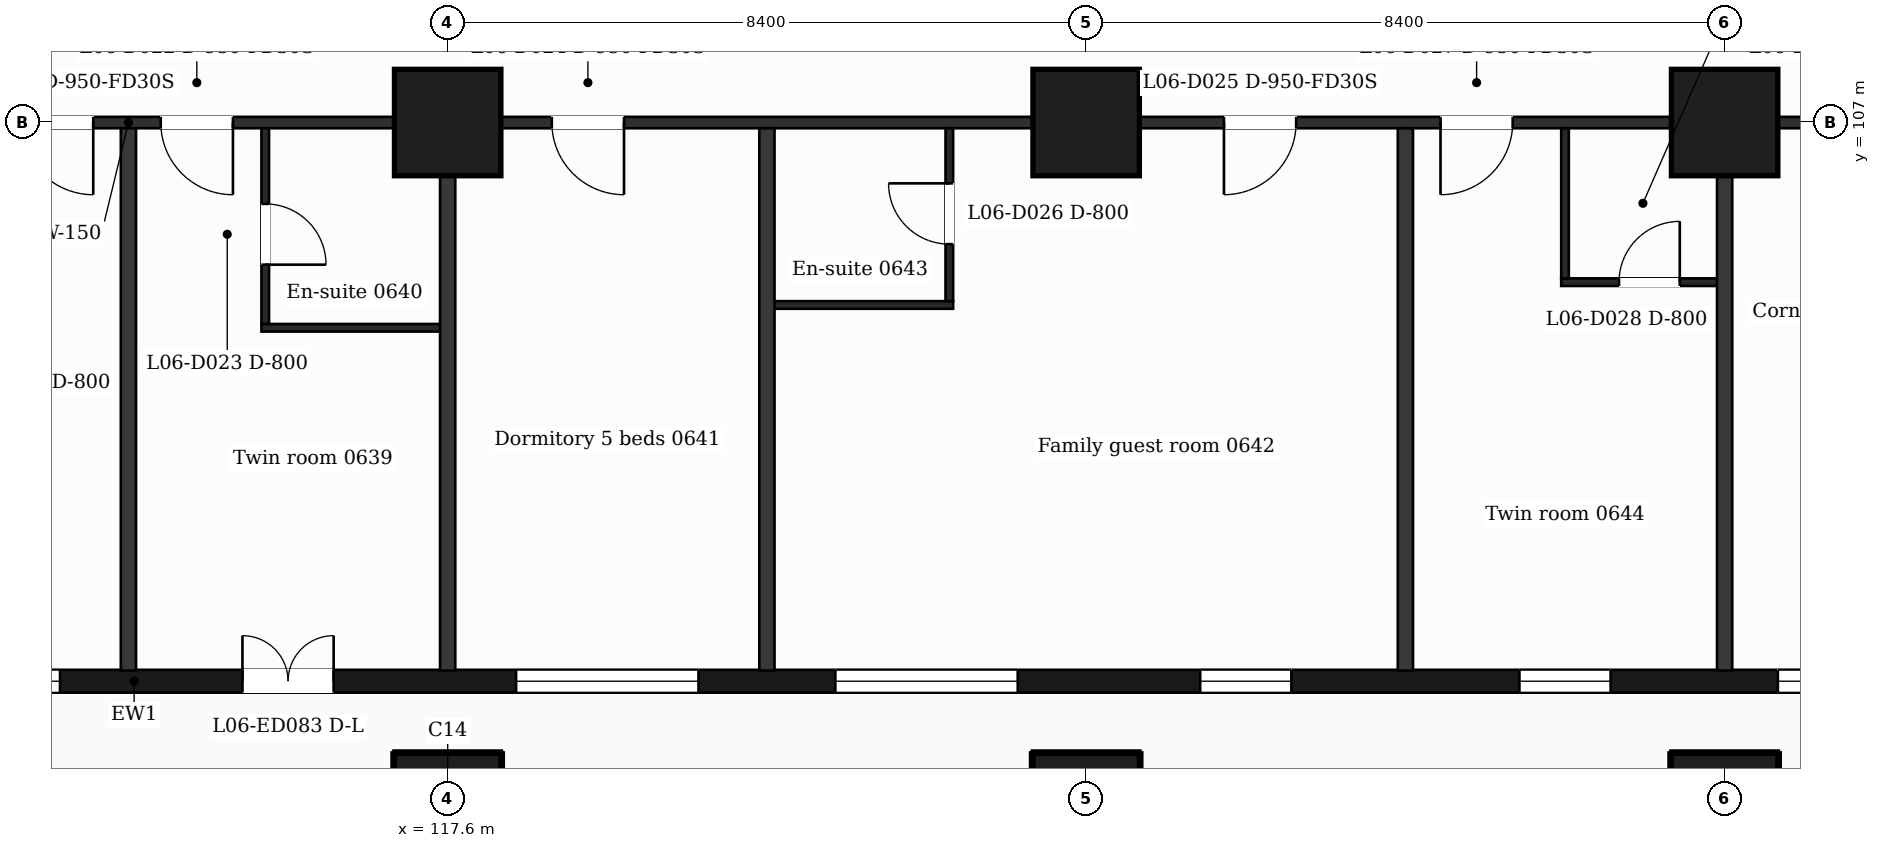
"""IFC4 building model, lengths in metres.
Left out: names, types, materials, properties, quantities, classifications, styles, units other than length and angle.
Written with IfcOpenShell. Run it as: python <this file> out.ifc"""

import sys

from ifc_helpers import new_model, si_unit, direction, frame, frame_2d, origin, origin_2d, place, context, subcontext, project, spatial, rectangle, extrude, element, fill, save


model = new_model("IFC4")
c1 = context("Model", 3, precision=1e-05, world=origin(), true_north=direction((0.0, 1.0)))
c2 = subcontext(c1, "Body", "Model", "MODEL_VIEW")
j1 = project(units=[si_unit("LENGTHUNIT", "METRE"), si_unit("PLANEANGLEUNIT", "RADIAN")], contexts=[c1])
p1 = place(None, origin())
s1 = spatial("IfcSite", under=j1, at=p1, CompositionType="ELEMENT")
p2 = place(p1, origin())
s2 = spatial("IfcBuilding", under=s1, at=p2, CompositionType="ELEMENT")
p3 = place(p2, frame((0.0, 0.0, 39.0)))
s3 = spatial("IfcBuildingStorey", under=s2, at=p3, CompositionType="ELEMENT", Elevation=39.0)
for number, where, z_axis, x_axis in (
    (1, (117.6, 98.0, -0.32), (0.0, 0.0, 1.0), (1.0, 0.0, 0.0)),
    (2, (126.0, 98.0, -0.32), (0.0, 0.0, 1.0), (1.0, 0.0, 0.0)),
    (3, (134.4, 98.0, -0.32), (0.0, 0.0, 1.0), (1.0, 0.0, 0.0)),
    (4, (117.6, 107.0, -0.32), (0.0, 0.0, 1.0), (1.0, 0.0, 0.0)),
    (5, (126.0, 107.0, -0.32), (0.0, 0.0, 1.0), (1.0, 0.0, 0.0)),
    (6, (134.4, 107.0, -0.32), (0.0, 0.0, 1.0), (1.0, 0.0, 0.0)),
):
    element("IfcColumn", number, at=place(p3, frame(where, z_axis=z_axis, x_axis=x_axis)), inside=s3, PredefinedType="COLUMN", context=c2, shape_type="SweptSolid", body=[
        extrude(rectangle(XDim=1.4, YDim=1.4, at=origin_2d()), origin(), (0.0, 0.0, 1.0), 3.82),
    ])
p4 = place(p3, frame((89.85, 99.65, 0.0), z_axis=(0.0, 0.0, 1.0), x_axis=(1.0, 0.0, 0.0)))
e7 = element("IfcWall", 7, at=p4, inside=s3, PredefinedType="SOLIDWALL", context=c2, shape_type="SweptSolid", body=[
    extrude(rectangle(XDim=47.25, YDim=0.3, at=frame_2d((23.625, 0.0))), origin(), (0.0, 0.0, 1.0), 3.18),
])
p5 = place(p4, frame((0.725, 0.0, 0.9)))
e8 = element("IfcOpeningElement", 8, at=p5, cuts=e7, PredefinedType="OPENING", context=c2, shape_type="SweptSolid", body=[
    extrude(rectangle(XDim=1.2, YDim=2.1, at=frame_2d((0.6, 1.05))), frame((0.0, 0.16, 0.0), z_axis=(0.0, -1.0, 0.0), x_axis=(1.0, 0.0, 0.0)), (0.0, 0.0, 1.0), 0.32),
])
p6 = place(p4, frame((3.45, 0.0, 0.9)))
e9 = element("IfcOpeningElement", 9, at=p6, cuts=e7, PredefinedType="OPENING", context=c2, shape_type="SweptSolid", body=[
    extrude(rectangle(XDim=2.4, YDim=2.1, at=frame_2d((1.2, 1.05))), frame((0.0, 0.16, 0.0), z_axis=(0.0, -1.0, 0.0), x_axis=(1.0, 0.0, 0.0)), (0.0, 0.0, 1.0), 0.32),
])
p7 = place(p4, frame((8.25, 0.0, 0.9)))
e10 = element("IfcOpeningElement", 10, at=p7, cuts=e7, PredefinedType="OPENING", context=c2, shape_type="SweptSolid", body=[
    extrude(rectangle(XDim=1.2, YDim=2.1, at=frame_2d((0.6, 1.05))), frame((0.0, 0.16, 0.0), z_axis=(0.0, -1.0, 0.0), x_axis=(1.0, 0.0, 0.0)), (0.0, 0.0, 1.0), 0.32),
])
p8 = place(p4, frame((12.45, 0.0, 0.9)))
e11 = element("IfcOpeningElement", 11, at=p8, cuts=e7, PredefinedType="OPENING", context=c2, shape_type="SweptSolid", body=[
    extrude(rectangle(XDim=1.2, YDim=2.1, at=frame_2d((0.6, 1.05))), frame((0.0, 0.16, 0.0), z_axis=(0.0, -1.0, 0.0), x_axis=(1.0, 0.0, 0.0)), (0.0, 0.0, 1.0), 0.32),
])
p9 = place(p4, frame((16.05, 0.0, 0.9)))
e12 = element("IfcOpeningElement", 12, at=p9, cuts=e7, PredefinedType="OPENING", context=c2, shape_type="SweptSolid", body=[
    extrude(rectangle(XDim=2.4, YDim=2.1, at=frame_2d((1.2, 1.05))), frame((0.0, 0.16, 0.0), z_axis=(0.0, -1.0, 0.0), x_axis=(1.0, 0.0, 0.0)), (0.0, 0.0, 1.0), 0.32),
])
p10 = place(p4, frame((20.25, 0.0, 0.9)))
e13 = element("IfcOpeningElement", 13, at=p10, cuts=e7, PredefinedType="OPENING", context=c2, shape_type="SweptSolid", body=[
    extrude(rectangle(XDim=2.4, YDim=2.1, at=frame_2d((1.2, 1.05))), frame((0.0, 0.16, 0.0), z_axis=(0.0, -1.0, 0.0), x_axis=(1.0, 0.0, 0.0)), (0.0, 0.0, 1.0), 0.32),
])
p11 = place(p4, frame((25.05, 0.0, 0.0)))
e14 = element("IfcOpeningElement", 14, at=p11, cuts=e7, PredefinedType="OPENING", context=c2, shape_type="SweptSolid", body=[
    extrude(rectangle(XDim=1.2, YDim=2.4, at=frame_2d((0.6, 1.2))), frame((0.0, 0.16, 0.0), z_axis=(0.0, -1.0, 0.0), x_axis=(1.0, 0.0, 0.0)), (0.0, 0.0, 1.0), 0.32),
])
p12 = place(p4, frame((28.65, 0.0, 0.9)))
e15 = element("IfcOpeningElement", 15, at=p12, cuts=e7, PredefinedType="OPENING", context=c2, shape_type="SweptSolid", body=[
    extrude(rectangle(XDim=2.4, YDim=2.1, at=frame_2d((1.2, 1.05))), frame((0.0, 0.16, 0.0), z_axis=(0.0, -1.0, 0.0), x_axis=(1.0, 0.0, 0.0)), (0.0, 0.0, 1.0), 0.32),
])
p13 = place(p4, frame((32.85, 0.0, 0.9)))
e16 = element("IfcOpeningElement", 16, at=p13, cuts=e7, PredefinedType="OPENING", context=c2, shape_type="SweptSolid", body=[
    extrude(rectangle(XDim=2.4, YDim=2.1, at=frame_2d((1.2, 1.05))), frame((0.0, 0.16, 0.0), z_axis=(0.0, -1.0, 0.0), x_axis=(1.0, 0.0, 0.0)), (0.0, 0.0, 1.0), 0.32),
])
p14 = place(p4, frame((37.65, 0.0, 0.9)))
e17 = element("IfcOpeningElement", 17, at=p14, cuts=e7, PredefinedType="OPENING", context=c2, shape_type="SweptSolid", body=[
    extrude(rectangle(XDim=1.2, YDim=2.1, at=frame_2d((0.6, 1.05))), frame((0.0, 0.16, 0.0), z_axis=(0.0, -1.0, 0.0), x_axis=(1.0, 0.0, 0.0)), (0.0, 0.0, 1.0), 0.32),
])
p15 = place(p4, frame((41.85, 0.0, 0.9)))
e18 = element("IfcOpeningElement", 18, at=p15, cuts=e7, PredefinedType="OPENING", context=c2, shape_type="SweptSolid", body=[
    extrude(rectangle(XDim=1.2, YDim=2.1, at=frame_2d((0.6, 1.05))), frame((0.0, 0.16, 0.0), z_axis=(0.0, -1.0, 0.0), x_axis=(1.0, 0.0, 0.0)), (0.0, 0.0, 1.0), 0.32),
])
p16 = place(p4, frame((45.25, 0.0, 0.9)))
e19 = element("IfcOpeningElement", 19, at=p16, cuts=e7, PredefinedType="OPENING", context=c2, shape_type="SweptSolid", body=[
    extrude(rectangle(XDim=1.2, YDim=2.1, at=frame_2d((0.6, 1.05))), frame((0.0, 0.16, 0.0), z_axis=(0.0, -1.0, 0.0), x_axis=(1.0, 0.0, 0.0)), (0.0, 0.0, 1.0), 0.32),
])
p17 = place(p3, frame((115.15, 104.3, 0.0), z_axis=(0.0, 0.0, 1.0), x_axis=(1.0, 0.0, 0.0)))
e20 = element("IfcWall", 20, at=p17, inside=s3, PredefinedType="PARTITIONING", context=c2, shape_type="SweptSolid", body=[
    extrude(rectangle(XDim=2.45, YDim=0.1, at=frame_2d((1.225, 0.0))), origin(), (0.0, 0.0, 1.0), 3.18),
])
p18 = place(p3, frame((121.8, 104.6, 0.0), z_axis=(0.0, 0.0, 1.0), x_axis=(1.0, 0.0, 0.0)))
e21 = element("IfcWall", 21, at=p18, inside=s3, PredefinedType="PARTITIONING", context=c2, shape_type="SweptSolid", body=[
    extrude(rectangle(XDim=2.45, YDim=0.1, at=frame_2d((1.225, 0.0))), origin(), (0.0, 0.0, 1.0), 3.18),
])
p19 = place(p3, frame((132.25, 104.9, 0.0), z_axis=(0.0, 0.0, 1.0), x_axis=(1.0, 0.0, 0.0)))
e22 = element("IfcWall", 22, at=p19, inside=s3, PredefinedType="PARTITIONING", context=c2, shape_type="SweptSolid", body=[
    extrude(rectangle(XDim=2.15, YDim=0.1, at=frame_2d((1.075, 0.0))), origin(), (0.0, 0.0, 1.0), 3.18),
])
p20 = place(p19, frame((0.76, 0.0, 0.0)))
e23 = element("IfcOpeningElement", 23, at=p20, cuts=e22, PredefinedType="OPENING", context=c2, shape_type="SweptSolid", body=[
    extrude(rectangle(XDim=0.8, YDim=2.1, at=frame_2d((0.4, 1.05))), frame((0.0, 0.06, 0.0), z_axis=(0.0, -1.0, 0.0), x_axis=(1.0, 0.0, 0.0)), (0.0, 0.0, 1.0), 0.12),
])
p21 = place(p3, frame((87.018, 107.0, 0.0), z_axis=(0.0, 0.0, 1.0), x_axis=(1.0, 0.0, 0.0)))
e24 = element("IfcWall", 24, at=p21, inside=s3, PredefinedType="PARTITIONING", context=c2, shape_type="SweptSolid", body=[
    extrude(rectangle(XDim=52.765, YDim=0.15, at=frame_2d((26.382, 0.0))), origin(), (0.0, 0.0, 1.0), 3.18),
])
p22 = place(p21, frame((1.032, 0.0, 0.0)))
e25 = element("IfcOpeningElement", 25, at=p22, cuts=e24, PredefinedType="OPENING", context=c2, shape_type="SweptSolid", body=[
    extrude(rectangle(XDim=0.95, YDim=2.1, at=frame_2d((0.475, 1.05))), frame((0.0, 0.085, 0.0), z_axis=(0.0, -1.0, 0.0), x_axis=(1.0, 0.0, 0.0)), (0.0, 0.0, 1.0), 0.17),
])
p23 = place(p21, frame((6.369, 0.0, 0.0)))
e26 = element("IfcOpeningElement", 26, at=p23, cuts=e24, PredefinedType="OPENING", context=c2, shape_type="SweptSolid", body=[
    extrude(rectangle(XDim=0.95, YDim=2.1, at=frame_2d((0.475, 1.05))), frame((0.0, 0.085, 0.0), z_axis=(0.0, -1.0, 0.0), x_axis=(1.0, 0.0, 0.0)), (0.0, 0.0, 1.0), 0.17),
])
p24 = place(p21, frame((10.952, 0.0, 0.0)))
e27 = element("IfcOpeningElement", 27, at=p24, cuts=e24, PredefinedType="OPENING", context=c2, shape_type="SweptSolid", body=[
    extrude(rectangle(XDim=0.95, YDim=2.1, at=frame_2d((0.475, 1.05))), frame((0.0, 0.085, 0.0), z_axis=(0.0, -1.0, 0.0), x_axis=(1.0, 0.0, 0.0)), (0.0, 0.0, 1.0), 0.17),
])
p25 = place(p21, frame((16.045, 0.0, 0.0)))
e28 = element("IfcOpeningElement", 28, at=p25, cuts=e24, PredefinedType="OPENING", context=c2, shape_type="SweptSolid", body=[
    extrude(rectangle(XDim=0.95, YDim=2.1, at=frame_2d((0.475, 1.05))), frame((0.0, 0.085, 0.0), z_axis=(0.0, -1.0, 0.0), x_axis=(1.0, 0.0, 0.0)), (0.0, 0.0, 1.0), 0.17),
])
p26 = place(p21, frame((20.245, 0.0, 0.0)))
e29 = element("IfcOpeningElement", 29, at=p26, cuts=e24, PredefinedType="OPENING", context=c2, shape_type="SweptSolid", body=[
    extrude(rectangle(XDim=0.95, YDim=2.1, at=frame_2d((0.475, 1.05))), frame((0.0, 0.085, 0.0), z_axis=(0.0, -1.0, 0.0), x_axis=(1.0, 0.0, 0.0)), (0.0, 0.0, 1.0), 0.17),
])
p27 = place(p21, frame((24.969, 0.0, 0.0)))
e30 = element("IfcOpeningElement", 30, at=p27, cuts=e24, PredefinedType="OPENING", context=c2, shape_type="SweptSolid", body=[
    extrude(rectangle(XDim=0.95, YDim=2.1, at=frame_2d((0.475, 1.05))), frame((0.0, 0.085, 0.0), z_axis=(0.0, -1.0, 0.0), x_axis=(1.0, 0.0, 0.0)), (0.0, 0.0, 1.0), 0.17),
])
p28 = place(p21, frame((26.807, 0.0, 0.0)))
e31 = element("IfcOpeningElement", 31, at=p28, cuts=e24, PredefinedType="OPENING", context=c2, shape_type="SweptSolid", body=[
    extrude(rectangle(XDim=0.95, YDim=2.1, at=frame_2d((0.475, 1.05))), frame((0.0, 0.085, 0.0), z_axis=(0.0, -1.0, 0.0), x_axis=(1.0, 0.0, 0.0)), (0.0, 0.0, 1.0), 0.17),
])
p29 = place(p21, frame((31.952, 0.0, 0.0)))
e32 = element("IfcOpeningElement", 32, at=p29, cuts=e24, PredefinedType="OPENING", context=c2, shape_type="SweptSolid", body=[
    extrude(rectangle(XDim=0.95, YDim=2.1, at=frame_2d((0.475, 1.05))), frame((0.0, 0.085, 0.0), z_axis=(0.0, -1.0, 0.0), x_axis=(1.0, 0.0, 0.0)), (0.0, 0.0, 1.0), 0.17),
])
p30 = place(p21, frame((40.795, 0.0, 0.0)))
e33 = element("IfcOpeningElement", 33, at=p30, cuts=e24, PredefinedType="OPENING", context=c2, shape_type="SweptSolid", body=[
    extrude(rectangle(XDim=0.95, YDim=2.1, at=frame_2d((0.475, 1.05))), frame((0.0, 0.085, 0.0), z_axis=(0.0, -1.0, 0.0), x_axis=(1.0, 0.0, 0.0)), (0.0, 0.0, 1.0), 0.17),
])
p31 = place(p21, frame((43.644, 0.0, 0.0)))
e34 = element("IfcOpeningElement", 34, at=p31, cuts=e24, PredefinedType="OPENING", context=c2, shape_type="SweptSolid", body=[
    extrude(rectangle(XDim=0.95, YDim=2.1, at=frame_2d((0.475, 1.05))), frame((0.0, 0.085, 0.0), z_axis=(0.0, -1.0, 0.0), x_axis=(1.0, 0.0, 0.0)), (0.0, 0.0, 1.0), 0.17),
])
p32 = place(p21, frame((48.767, 0.0, 0.0)))
e35 = element("IfcOpeningElement", 35, at=p32, cuts=e24, PredefinedType="OPENING", context=c2, shape_type="SweptSolid", body=[
    extrude(rectangle(XDim=0.95, YDim=2.1, at=frame_2d((0.475, 1.05))), frame((0.0, 0.085, 0.0), z_axis=(0.0, -1.0, 0.0), x_axis=(1.0, 0.0, 0.0)), (0.0, 0.0, 1.0), 0.17),
])
p33 = place(p3, frame((113.4, 99.79, 0.0), z_axis=(0.0, 0.0, 1.0), x_axis=(0.0, 1.0, 0.0)))
e36 = element("IfcWall", 36, at=p33, inside=s3, PredefinedType="PARTITIONING", context=c2, shape_type="SweptSolid", body=[
    extrude(rectangle(XDim=7.135, YDim=0.2, at=frame_2d((3.567, 0.0))), origin(), (0.0, 0.0, 1.0), 3.18),
])
p34 = place(p3, frame((115.2, 104.35, 0.0), z_axis=(0.0, 0.0, 1.0), x_axis=(0.0, 1.0, 0.0)))
e37 = element("IfcWall", 37, at=p34, inside=s3, PredefinedType="PARTITIONING", context=c2, shape_type="SweptSolid", body=[
    extrude(rectangle(XDim=2.575, YDim=0.1, at=frame_2d((1.288, 0.0))), origin(), (0.0, 0.0, 1.0), 3.18),
])
p35 = place(p34, frame((0.78, 0.0, 0.0)))
e38 = element("IfcOpeningElement", 38, at=p35, cuts=e37, PredefinedType="OPENING", context=c2, shape_type="SweptSolid", body=[
    extrude(rectangle(XDim=0.8, YDim=2.1, at=frame_2d((0.4, 1.05))), frame((0.0, 0.06, 0.0), z_axis=(0.0, -1.0, 0.0), x_axis=(1.0, 0.0, 0.0)), (0.0, 0.0, 1.0), 0.12),
])
for number, where, z_axis, x_axis in (
    (39, (117.6, 99.79, 0.0), (0.0, 0.0, 1.0), (0.0, 1.0, 0.0)),
    (40, (121.8, 99.79, 0.0), (0.0, 0.0, 1.0), (0.0, 1.0, 0.0)),
):
    element("IfcWall", number, at=place(p3, frame(where, z_axis=z_axis, x_axis=x_axis)), inside=s3, PredefinedType="PARTITIONING", context=c2, shape_type="SweptSolid", body=[
        extrude(rectangle(XDim=7.135, YDim=0.2, at=frame_2d((3.567, 0.0))), origin(), (0.0, 0.0, 1.0), 3.18),
    ])
p36 = place(p3, frame((124.2, 104.65, 0.0), z_axis=(0.0, 0.0, 1.0), x_axis=(0.0, 1.0, 0.0)))
e41 = element("IfcWall", 41, at=p36, inside=s3, PredefinedType="PARTITIONING", context=c2, shape_type="SweptSolid", body=[
    extrude(rectangle(XDim=2.275, YDim=0.1, at=frame_2d((1.138, 0.0))), origin(), (0.0, 0.0, 1.0), 3.18),
])
p37 = place(p36, frame((0.75, 0.0, 0.0)))
e42 = element("IfcOpeningElement", 42, at=p37, cuts=e41, PredefinedType="OPENING", context=c2, shape_type="SweptSolid", body=[
    extrude(rectangle(XDim=0.8, YDim=2.1, at=frame_2d((0.4, 1.05))), frame((0.0, 0.06, 0.0), z_axis=(0.0, -1.0, 0.0), x_axis=(1.0, 0.0, 0.0)), (0.0, 0.0, 1.0), 0.12),
])
p38 = place(p3, frame((130.2, 99.79, 0.0), z_axis=(0.0, 0.0, 1.0), x_axis=(0.0, 1.0, 0.0)))
e43 = element("IfcWall", 43, at=p38, inside=s3, PredefinedType="PARTITIONING", context=c2, shape_type="SweptSolid", body=[
    extrude(rectangle(XDim=7.135, YDim=0.2, at=frame_2d((3.567, 0.0))), origin(), (0.0, 0.0, 1.0), 3.18),
])
p39 = place(p3, frame((132.3, 104.95, 0.0), z_axis=(0.0, 0.0, 1.0), x_axis=(0.0, 1.0, 0.0)))
e44 = element("IfcWall", 44, at=p39, inside=s3, PredefinedType="PARTITIONING", context=c2, shape_type="SweptSolid", body=[
    extrude(rectangle(XDim=1.975, YDim=0.1, at=frame_2d((0.988, 0.0))), origin(), (0.0, 0.0, 1.0), 3.18),
])
p40 = place(p3, frame((134.4, 99.79, 0.0), z_axis=(0.0, 0.0, 1.0), x_axis=(0.0, 1.0, 0.0)))
e45 = element("IfcWall", 45, at=p40, inside=s3, PredefinedType="PARTITIONING", context=c2, shape_type="SweptSolid", body=[
    extrude(rectangle(XDim=7.135, YDim=0.2, at=frame_2d((3.567, 0.0))), origin(), (0.0, 0.0, 1.0), 3.18),
])
p41 = place(p10, origin())
e46 = element("IfcWindow", 46, at=p41, inside=s3, PartitioningType="SINGLE_PANEL", PredefinedType="WINDOW", context=c2, shape_type="SweptSolid", body=[
    extrude(rectangle(XDim=2.4, YDim=2.1, at=frame_2d((1.2, 1.05))), frame((0.0, 0.03, 0.0), z_axis=(0.0, -1.0, 0.0), x_axis=(1.0, 0.0, 0.0)), (0.0, 0.0, 1.0), 0.06),
])
fill(e13, e46)
p42 = place(p11, origin())
e47 = element("IfcDoor", 47, at=p42, inside=s3, OperationType="DOUBLE_DOOR_SINGLE_SWING", PredefinedType="DOOR", context=c2, shape_type="SweptSolid", body=[
    extrude(rectangle(XDim=1.2, YDim=2.4, at=frame_2d((0.6, 1.2))), frame((0.0, 0.025, 0.0), z_axis=(0.0, -1.0, 0.0), x_axis=(1.0, 0.0, 0.0)), (0.0, 0.0, 1.0), 0.05),
])
fill(e14, e47)
p43 = place(p12, origin())
e48 = element("IfcWindow", 48, at=p43, inside=s3, PartitioningType="SINGLE_PANEL", PredefinedType="WINDOW", context=c2, shape_type="SweptSolid", body=[
    extrude(rectangle(XDim=2.4, YDim=2.1, at=frame_2d((1.2, 1.05))), frame((0.0, 0.03, 0.0), z_axis=(0.0, -1.0, 0.0), x_axis=(1.0, 0.0, 0.0)), (0.0, 0.0, 1.0), 0.06),
])
fill(e15, e48)
p44 = place(p13, origin())
e49 = element("IfcWindow", 49, at=p44, inside=s3, PartitioningType="SINGLE_PANEL", PredefinedType="WINDOW", context=c2, shape_type="SweptSolid", body=[
    extrude(rectangle(XDim=2.4, YDim=2.1, at=frame_2d((1.2, 1.05))), frame((0.0, 0.03, 0.0), z_axis=(0.0, -1.0, 0.0), x_axis=(1.0, 0.0, 0.0)), (0.0, 0.0, 1.0), 0.06),
])
fill(e16, e49)
p45 = place(p14, origin())
e50 = element("IfcWindow", 50, at=p45, inside=s3, PartitioningType="SINGLE_PANEL", PredefinedType="WINDOW", context=c2, shape_type="SweptSolid", body=[
    extrude(rectangle(XDim=1.2, YDim=2.1, at=frame_2d((0.6, 1.05))), frame((0.0, 0.03, 0.0), z_axis=(0.0, -1.0, 0.0), x_axis=(1.0, 0.0, 0.0)), (0.0, 0.0, 1.0), 0.06),
])
fill(e17, e50)
p46 = place(p15, origin())
e51 = element("IfcWindow", 51, at=p46, inside=s3, PartitioningType="SINGLE_PANEL", PredefinedType="WINDOW", context=c2, shape_type="SweptSolid", body=[
    extrude(rectangle(XDim=1.2, YDim=2.1, at=frame_2d((0.6, 1.05))), frame((0.0, 0.03, 0.0), z_axis=(0.0, -1.0, 0.0), x_axis=(1.0, 0.0, 0.0)), (0.0, 0.0, 1.0), 0.06),
])
fill(e18, e51)
p47 = place(p16, origin())
e52 = element("IfcWindow", 52, at=p47, inside=s3, PartitioningType="SINGLE_PANEL", PredefinedType="WINDOW", context=c2, shape_type="SweptSolid", body=[
    extrude(rectangle(XDim=1.2, YDim=2.1, at=frame_2d((0.6, 1.05))), frame((0.0, 0.03, 0.0), z_axis=(0.0, -1.0, 0.0), x_axis=(1.0, 0.0, 0.0)), (0.0, 0.0, 1.0), 0.06),
])
fill(e19, e52)
p48 = place(p27, origin())
e53 = element("IfcDoor", 53, at=p48, inside=s3, OperationType="SINGLE_SWING_RIGHT", PredefinedType="DOOR", context=c2, shape_type="SweptSolid", body=[
    extrude(rectangle(XDim=0.95, YDim=2.1, at=frame_2d((0.475, 1.05))), frame((0.0, 0.025, 0.0), z_axis=(0.0, -1.0, 0.0), x_axis=(1.0, 0.0, 0.0)), (0.0, 0.0, 1.0), 0.05),
])
fill(e30, e53)
p49 = place(p28, origin())
e54 = element("IfcDoor", 54, at=p49, inside=s3, OperationType="SINGLE_SWING_RIGHT", PredefinedType="DOOR", context=c2, shape_type="SweptSolid", body=[
    extrude(rectangle(XDim=0.95, YDim=2.1, at=frame_2d((0.475, 1.05))), frame((0.0, 0.025, 0.0), z_axis=(0.0, -1.0, 0.0), x_axis=(1.0, 0.0, 0.0)), (0.0, 0.0, 1.0), 0.05),
])
fill(e31, e54)
p50 = place(p35, origin())
e55 = element("IfcDoor", 55, at=p50, inside=s3, OperationType="SINGLE_SWING_LEFT", PredefinedType="DOOR", context=c2, shape_type="SweptSolid", body=[
    extrude(rectangle(XDim=0.8, YDim=2.1, at=frame_2d((0.4, 1.05))), frame((0.0, 0.025, 0.0), z_axis=(0.0, -1.0, 0.0), x_axis=(1.0, 0.0, 0.0)), (0.0, 0.0, 1.0), 0.05),
])
fill(e38, e55)
p51 = place(p29, origin())
e56 = element("IfcDoor", 56, at=p51, inside=s3, OperationType="SINGLE_SWING_RIGHT", PredefinedType="DOOR", context=c2, shape_type="SweptSolid", body=[
    extrude(rectangle(XDim=0.95, YDim=2.1, at=frame_2d((0.475, 1.05))), frame((0.0, 0.025, 0.0), z_axis=(0.0, -1.0, 0.0), x_axis=(1.0, 0.0, 0.0)), (0.0, 0.0, 1.0), 0.05),
])
fill(e32, e56)
p52 = place(p30, origin())
e57 = element("IfcDoor", 57, at=p52, inside=s3, OperationType="SINGLE_SWING_LEFT", PredefinedType="DOOR", context=c2, shape_type="SweptSolid", body=[
    extrude(rectangle(XDim=0.95, YDim=2.1, at=frame_2d((0.475, 1.05))), frame((0.0, 0.025, 0.0), z_axis=(0.0, -1.0, 0.0), x_axis=(1.0, 0.0, 0.0)), (0.0, 0.0, 1.0), 0.05),
])
fill(e33, e57)
p53 = place(p37, origin())
e58 = element("IfcDoor", 58, at=p53, inside=s3, OperationType="SINGLE_SWING_RIGHT", PredefinedType="DOOR", context=c2, shape_type="SweptSolid", body=[
    extrude(rectangle(XDim=0.8, YDim=2.1, at=frame_2d((0.4, 1.05))), frame((0.0, 0.025, 0.0), z_axis=(0.0, -1.0, 0.0), x_axis=(1.0, 0.0, 0.0)), (0.0, 0.0, 1.0), 0.05),
])
fill(e42, e58)
p54 = place(p31, origin())
e59 = element("IfcDoor", 59, at=p54, inside=s3, OperationType="SINGLE_SWING_LEFT", PredefinedType="DOOR", context=c2, shape_type="SweptSolid", body=[
    extrude(rectangle(XDim=0.95, YDim=2.1, at=frame_2d((0.475, 1.05))), frame((0.0, 0.025, 0.0), z_axis=(0.0, -1.0, 0.0), x_axis=(1.0, 0.0, 0.0)), (0.0, 0.0, 1.0), 0.05),
])
fill(e34, e59)
p55 = place(p20, origin())
e60 = element("IfcDoor", 60, at=p55, inside=s3, OperationType="SINGLE_SWING_RIGHT", PredefinedType="DOOR", context=c2, shape_type="SweptSolid", body=[
    extrude(rectangle(XDim=0.8, YDim=2.1, at=frame_2d((0.4, 1.05))), frame((0.0, 0.025, 0.0), z_axis=(0.0, -1.0, 0.0), x_axis=(1.0, 0.0, 0.0)), (0.0, 0.0, 1.0), 0.05),
])
fill(e23, e60)
save(model, sys.argv[1])
